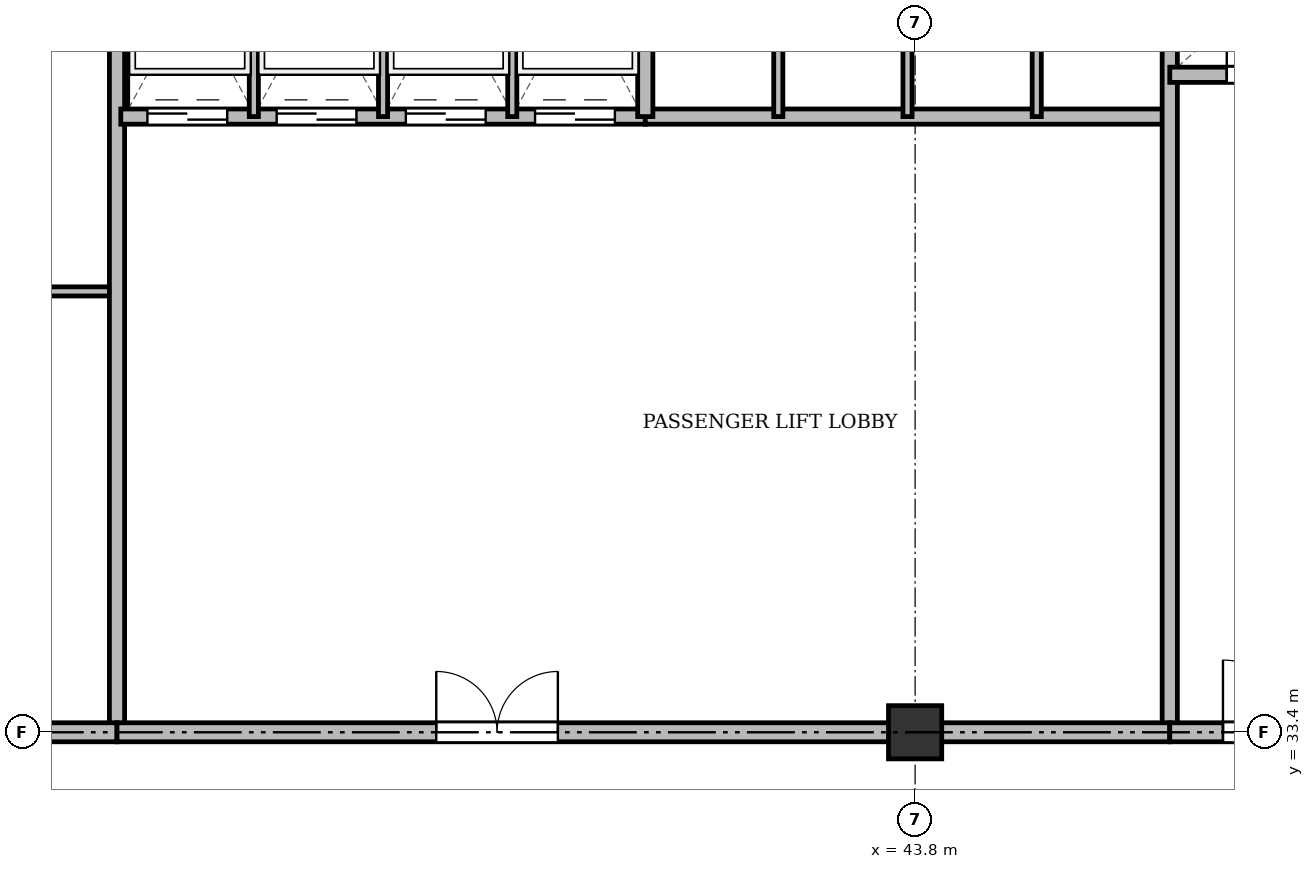
"""IFC4 building model, lengths in metres.
Left out: names, types, materials, properties, quantities, classifications, styles, units other than length and angle.
Written with IfcOpenShell. Run it as: python <this file> out.ifc"""

import sys

from ifc_helpers import new_model, si_unit, direction, frame, frame_2d, origin, origin_2d, place, context, subcontext, project, spatial, rectangle, extrude, source, transform, mapped, element, fill, save


model = new_model("IFC4")
c1 = context("Model", 3, precision=1e-05, world=origin(), true_north=direction((0.0, 1.0)))
c2 = subcontext(c1, "Body", "Model", "MODEL_VIEW")
j1 = project(units=[si_unit("LENGTHUNIT", "METRE"), si_unit("PLANEANGLEUNIT", "RADIAN")], contexts=[c1])
p1 = place(None, origin())
s1 = spatial("IfcSite", under=j1, at=p1, CompositionType="ELEMENT")
p2 = place(p1, origin())
s2 = spatial("IfcBuilding", under=s1, at=p2, CompositionType="ELEMENT")
p3 = place(p2, frame((0.0, 0.0, 178.9)))
s3 = spatial("IfcBuildingStorey", under=s2, at=p3, CompositionType="ELEMENT", Elevation=178.9)
m1 = source(origin(), c2, "Body", "SweptSolid", [
    extrude(rectangle(XDim=0.7, YDim=0.7, at=origin_2d()), origin(), (0.0, 0.0, 1.0), 3.6),
])
p4 = place(p3, frame((43.8, 33.4, 0.0), z_axis=(0.0, 0.0, 1.0), x_axis=(1.0, 0.0, 0.0)))
e1 = element("IfcColumn", 1, at=p4, inside=s3, PredefinedType="COLUMN", context=c2, shape_type="MappedRepresentation", body=[
    mapped(m1, transform((0.0, 0.0, 0.0), x_axis=(1.0, 0.0, 0.0), y_axis=(0.0, 1.0, 0.0), z_axis=(0.0, 0.0, 1.0), scale=1.0)),
])
p5 = place(p3, frame((26.3, 39.2, 0.0), z_axis=(0.0, 0.0, 1.0), x_axis=(1.0, 0.0, 0.0)))
e2 = element("IfcWall", 2, at=p5, inside=s3, PredefinedType="PARTITIONING", context=c2, shape_type="SweptSolid", body=[
    extrude(rectangle(XDim=7.0, YDim=0.12, at=frame_2d((3.5, 0.0))), origin(), (0.0, 0.0, 1.0), 2.72),
])
p6 = place(p5, frame((2.6, 0.0, 0.0)))
e3 = element("IfcOpeningElement", 3, at=p6, cuts=e2, PredefinedType="OPENING", context=c2, shape_type="SweptSolid", body=[
    extrude(rectangle(XDim=0.95, YDim=2.15, at=frame_2d((0.475, 1.075))), frame((0.0, 0.07, 0.0), z_axis=(0.0, -1.0, 0.0), x_axis=(1.0, 0.0, 0.0)), (0.0, 0.0, 1.0), 0.14),
])
p7 = place(p3, frame((33.3, 33.4, 0.0), z_axis=(0.0, 0.0, 1.0), x_axis=(0.0, 1.0, 0.0)))
e4 = element("IfcWall", 4, at=p7, inside=s3, PredefinedType="SOLIDWALL", context=c2, shape_type="SweptSolid", body=[
    extrude(rectangle(XDim=11.3, YDim=0.2, at=frame_2d((5.65, 0.0))), origin(), (0.0, 0.0, 1.0), 2.62),
])
p8 = place(p3, frame((33.35, 41.5, 0.0), z_axis=(0.0, 0.0, 1.0), x_axis=(1.0, 0.0, 0.0)))
e5 = element("IfcWall", 5, at=p8, inside=s3, PredefinedType="SOLIDWALL", context=c2, shape_type="SweptSolid", body=[
    extrude(rectangle(XDim=6.9, YDim=0.2, at=frame_2d((3.45, 0.0))), origin(), (0.0, 0.0, 1.0), 3.22),
])
p9 = place(p8, frame((0.35, 0.0, 0.0)))
e6 = element("IfcOpeningElement", 6, at=p9, cuts=e5, PredefinedType="OPENING", context=c2, shape_type="SweptSolid", body=[
    extrude(rectangle(XDim=1.05, YDim=2.15, at=frame_2d((0.525, 1.075))), frame((0.0, 0.11, 0.0), z_axis=(0.0, -1.0, 0.0), x_axis=(1.0, 0.0, 0.0)), (0.0, 0.0, 1.0), 0.22),
])
p10 = place(p8, frame((2.05, 0.0, 0.0)))
e7 = element("IfcOpeningElement", 7, at=p10, cuts=e5, PredefinedType="OPENING", context=c2, shape_type="SweptSolid", body=[
    extrude(rectangle(XDim=1.05, YDim=2.15, at=frame_2d((0.525, 1.075))), frame((0.0, 0.11, 0.0), z_axis=(0.0, -1.0, 0.0), x_axis=(1.0, 0.0, 0.0)), (0.0, 0.0, 1.0), 0.22),
])
p11 = place(p8, frame((3.75, 0.0, 0.0)))
e8 = element("IfcOpeningElement", 8, at=p11, cuts=e5, PredefinedType="OPENING", context=c2, shape_type="SweptSolid", body=[
    extrude(rectangle(XDim=1.05, YDim=2.15, at=frame_2d((0.525, 1.075))), frame((0.0, 0.11, 0.0), z_axis=(0.0, -1.0, 0.0), x_axis=(1.0, 0.0, 0.0)), (0.0, 0.0, 1.0), 0.22),
])
p12 = place(p8, frame((5.45, 0.0, 0.0)))
e9 = element("IfcOpeningElement", 9, at=p12, cuts=e5, PredefinedType="OPENING", context=c2, shape_type="SweptSolid", body=[
    extrude(rectangle(XDim=1.05, YDim=2.15, at=frame_2d((0.525, 1.075))), frame((0.0, 0.11, 0.0), z_axis=(0.0, -1.0, 0.0), x_axis=(1.0, 0.0, 0.0)), (0.0, 0.0, 1.0), 0.22),
])
for number, where, z_axis, x_axis in (
    (10, (35.1, 41.5, 0.0), (0.0, 0.0, 1.0), (0.0, 1.0, 0.0)),
    (11, (36.8, 41.5, 0.0), (0.0, 0.0, 1.0), (0.0, 1.0, 0.0)),
    (12, (38.5, 41.5, 0.0), (0.0, 0.0, 1.0), (0.0, 1.0, 0.0)),
):
    element("IfcWall", number, at=place(p3, frame(where, z_axis=z_axis, x_axis=x_axis)), inside=s3, PredefinedType="PARTITIONING", context=c2, shape_type="SweptSolid", body=[
        extrude(rectangle(XDim=3.2, YDim=0.12, at=frame_2d((1.6, 0.0))), origin(), (0.0, 0.0, 1.0), 3.22),
    ])
p13 = place(p3, frame((40.25, 41.5, 0.0), z_axis=(0.0, 0.0, 1.0), x_axis=(1.0, 0.0, 0.0)))
e13 = element("IfcWall", 13, at=p13, inside=s3, PredefinedType="SOLIDWALL", context=c2, shape_type="SweptSolid", body=[
    extrude(rectangle(XDim=6.9, YDim=0.2, at=frame_2d((3.45, 0.0))), origin(), (0.0, 0.0, 1.0), 2.72),
])
p14 = place(p3, frame((40.25, 41.5, 0.0), z_axis=(0.0, 0.0, 1.0), x_axis=(0.0, 1.0, 0.0)))
e14 = element("IfcWall", 14, at=p14, inside=s3, PredefinedType="SOLIDWALL", context=c2, shape_type="SweptSolid", body=[
    extrude(rectangle(XDim=3.2, YDim=0.2, at=frame_2d((1.6, 0.0))), origin(), (0.0, 0.0, 1.0), 3.22),
])
p15 = place(p3, frame((42.0, 41.5, 0.0), z_axis=(0.0, 0.0, 1.0), x_axis=(0.0, 1.0, 0.0)))
e15 = element("IfcWall", 15, at=p15, inside=s3, PredefinedType="PARTITIONING", context=c2, shape_type="SweptSolid", body=[
    extrude(rectangle(XDim=3.2, YDim=0.12, at=frame_2d((1.6, 0.0))), origin(), (0.0, 0.0, 1.0), 3.22),
])
p16 = place(p3, frame((43.7, 41.5, 0.0), z_axis=(0.0, 0.0, 1.0), x_axis=(0.0, 1.0, 0.0)))
e16 = element("IfcWall", 16, at=p16, inside=s3, PredefinedType="PARTITIONING", context=c2, shape_type="SweptSolid", body=[
    extrude(rectangle(XDim=3.2, YDim=0.12, at=frame_2d((1.6, 0.0))), origin(), (0.0, 0.0, 1.0), 2.72),
])
p17 = place(p3, frame((45.4, 41.5, 0.0), z_axis=(0.0, 0.0, 1.0), x_axis=(0.0, 1.0, 0.0)))
e17 = element("IfcWall", 17, at=p17, inside=s3, PredefinedType="PARTITIONING", context=c2, shape_type="SweptSolid", body=[
    extrude(rectangle(XDim=3.2, YDim=0.12, at=frame_2d((1.6, 0.0))), origin(), (0.0, 0.0, 1.0), 3.22),
])
p18 = place(p3, frame((47.15, 33.4, 0.0), z_axis=(0.0, 0.0, 1.0), x_axis=(0.0, 1.0, 0.0)))
e18 = element("IfcWall", 18, at=p18, inside=s3, PredefinedType="SOLIDWALL", context=c2, shape_type="SweptSolid", body=[
    extrude(rectangle(XDim=11.3, YDim=0.2, at=frame_2d((5.65, 0.0))), origin(), (0.0, 0.0, 1.0), 2.62),
])
p19 = place(p3, frame((26.3, 33.4, 0.0), z_axis=(0.0, 0.0, 1.0), x_axis=(1.0, 0.0, 0.0)))
e19 = element("IfcWall", 19, at=p19, inside=s3, PredefinedType="PARTITIONING", context=c2, shape_type="SweptSolid", body=[
    extrude(rectangle(XDim=7.0, YDim=0.25, at=frame_2d((3.5, 0.0))), origin(), (0.0, 0.0, 1.0), 2.62),
])
p20 = place(p19, frame((1.35, 0.0, 0.0)))
e20 = element("IfcOpeningElement", 20, at=p20, cuts=e19, PredefinedType="OPENING", context=c2, shape_type="SweptSolid", body=[
    extrude(rectangle(XDim=0.95, YDim=2.15, at=frame_2d((0.475, 1.075))), frame((0.0, 0.135, 0.0), z_axis=(0.0, -1.0, 0.0), x_axis=(1.0, 0.0, 0.0)), (0.0, 0.0, 1.0), 0.27),
])
p21 = place(p3, frame((33.3, 33.4, 0.0), z_axis=(0.0, 0.0, 1.0), x_axis=(1.0, 0.0, 0.0)))
e21 = element("IfcWall", 21, at=p21, inside=s3, PredefinedType="PARTITIONING", context=c2, shape_type="SweptSolid", body=[
    extrude(rectangle(XDim=13.85, YDim=0.25, at=frame_2d((6.925, 0.0))), origin(), (0.0, 0.0, 1.0), 2.62),
])
p22 = place(p21, frame((4.2, 0.0, 0.0)))
e22 = element("IfcOpeningElement", 22, at=p22, cuts=e21, PredefinedType="OPENING", context=c2, shape_type="SweptSolid", body=[
    extrude(rectangle(XDim=1.6, YDim=2.2, at=frame_2d((0.8, 1.1))), frame((0.0, 0.135, 0.0), z_axis=(0.0, -1.0, 0.0), x_axis=(1.0, 0.0, 0.0)), (0.0, 0.0, 1.0), 0.27),
])
p23 = place(p3, frame((47.15, 42.05, 0.0), z_axis=(0.0, 0.0, 1.0), x_axis=(1.0, 0.0, 0.0)))
e23 = element("IfcWall", 23, at=p23, inside=s3, PredefinedType="SOLIDWALL", context=c2, shape_type="SweptSolid", body=[
    extrude(rectangle(XDim=7.85, YDim=0.2, at=frame_2d((3.925, 0.0))), origin(), (0.0, 0.0, 1.0), 2.72),
])
p24 = place(p23, frame((0.75, 0.0, 0.0)))
e24 = element("IfcOpeningElement", 24, at=p24, cuts=e23, PredefinedType="OPENING", context=c2, shape_type="SweptSolid", body=[
    extrude(rectangle(XDim=0.9, YDim=2.1, at=frame_2d((0.45, 1.05))), frame((0.0, 0.11, 0.0), z_axis=(0.0, -1.0, 0.0), x_axis=(1.0, 0.0, 0.0)), (0.0, 0.0, 1.0), 0.22),
])
p25 = place(p23, frame((3.85, 0.0, 0.0)))
e25 = element("IfcOpeningElement", 25, at=p25, cuts=e23, PredefinedType="OPENING", context=c2, shape_type="SweptSolid", body=[
    extrude(rectangle(XDim=0.9, YDim=2.1, at=frame_2d((0.45, 1.05))), frame((0.0, 0.11, 0.0), z_axis=(0.0, -1.0, 0.0), x_axis=(1.0, 0.0, 0.0)), (0.0, 0.0, 1.0), 0.22),
])
p26 = place(p3, frame((47.15, 33.4, 0.0), z_axis=(0.0, 0.0, 1.0), x_axis=(1.0, 0.0, 0.0)))
e26 = element("IfcWall", 26, at=p26, inside=s3, PredefinedType="PARTITIONING", context=c2, shape_type="SweptSolid", body=[
    extrude(rectangle(XDim=11.15, YDim=0.25, at=frame_2d((5.575, 0.0))), origin(), (0.0, 0.0, 1.0), 2.62),
])
p27 = place(p26, frame((0.7, 0.0, 0.0)))
e27 = element("IfcOpeningElement", 27, at=p27, cuts=e26, PredefinedType="OPENING", context=c2, shape_type="SweptSolid", body=[
    extrude(rectangle(XDim=0.95, YDim=2.15, at=frame_2d((0.475, 1.075))), frame((0.0, 0.135, 0.0), z_axis=(0.0, -1.0, 0.0), x_axis=(1.0, 0.0, 0.0)), (0.0, 0.0, 1.0), 0.27),
])
p28 = place(p26, frame((6.0, 0.0, 0.0)))
e28 = element("IfcOpeningElement", 28, at=p28, cuts=e26, PredefinedType="OPENING", context=c2, shape_type="SweptSolid", body=[
    extrude(rectangle(XDim=1.2, YDim=2.15, at=frame_2d((0.6, 1.075))), frame((0.0, 0.135, 0.0), z_axis=(0.0, -1.0, 0.0), x_axis=(1.0, 0.0, 0.0)), (0.0, 0.0, 1.0), 0.27),
])
m2 = source(origin(), c2, "Body", "SweptSolid", [
    extrude(rectangle(XDim=1.05, YDim=2.15, at=frame_2d((0.525, 1.075))), frame((0.0, 0.025, 0.0), z_axis=(0.0, -1.0, 0.0), x_axis=(1.0, 0.0, 0.0)), (0.0, 0.0, 1.0), 0.05),
])
p29 = place(p9, origin())
e29 = element("IfcDoor", 29, at=p29, inside=s3, OperationType="DOUBLE_DOOR_SLIDING", PredefinedType="DOOR", context=c2, shape_type="MappedRepresentation", body=[
    mapped(m2, transform((0.0, 0.0, 0.0), x_axis=(1.0, 0.0, 0.0), y_axis=(0.0, 1.0, 0.0), z_axis=(0.0, 0.0, 1.0), scale=1.0)),
])
fill(e6, e29)
p30 = place(p10, origin())
e30 = element("IfcDoor", 30, at=p30, inside=s3, OperationType="DOUBLE_DOOR_SLIDING", PredefinedType="DOOR", context=c2, shape_type="MappedRepresentation", body=[
    mapped(m2, transform((0.0, 0.0, 0.0), x_axis=(1.0, 0.0, 0.0), y_axis=(0.0, 1.0, 0.0), z_axis=(0.0, 0.0, 1.0), scale=1.0)),
])
fill(e7, e30)
p31 = place(p11, origin())
e31 = element("IfcDoor", 31, at=p31, inside=s3, OperationType="DOUBLE_DOOR_SLIDING", PredefinedType="DOOR", context=c2, shape_type="MappedRepresentation", body=[
    mapped(m2, transform((0.0, 0.0, 0.0), x_axis=(1.0, 0.0, 0.0), y_axis=(0.0, 1.0, 0.0), z_axis=(0.0, 0.0, 1.0), scale=1.0)),
])
fill(e8, e31)
p32 = place(p12, origin())
e32 = element("IfcDoor", 32, at=p32, inside=s3, OperationType="DOUBLE_DOOR_SLIDING", PredefinedType="DOOR", context=c2, shape_type="MappedRepresentation", body=[
    mapped(m2, transform((0.0, 0.0, 0.0), x_axis=(1.0, 0.0, 0.0), y_axis=(0.0, 1.0, 0.0), z_axis=(0.0, 0.0, 1.0), scale=1.0)),
])
fill(e9, e32)
m3 = source(origin(), c2, "Body", "SweptSolid", [
    extrude(rectangle(XDim=1.6, YDim=2.2, at=frame_2d((0.8, 1.1))), frame((0.0, 0.025, 0.0), z_axis=(0.0, -1.0, 0.0), x_axis=(1.0, 0.0, 0.0)), (0.0, 0.0, 1.0), 0.05),
])
p33 = place(p22, origin())
e33 = element("IfcDoor", 33, at=p33, inside=s3, OperationType="DOUBLE_DOOR_SINGLE_SWING", PredefinedType="DOOR", context=c2, shape_type="MappedRepresentation", body=[
    mapped(m3, transform((0.0, 0.0, 0.0), x_axis=(1.0, 0.0, 0.0), y_axis=(0.0, 1.0, 0.0), z_axis=(0.0, 0.0, 1.0), scale=1.0)),
])
fill(e22, e33)
m4 = source(origin(), c2, "Body", "SweptSolid", [
    extrude(rectangle(XDim=0.9, YDim=2.1, at=frame_2d((0.45, 1.05))), frame((0.0, 0.025, 0.0), z_axis=(0.0, -1.0, 0.0), x_axis=(1.0, 0.0, 0.0)), (0.0, 0.0, 1.0), 0.05),
])
p34 = place(p24, origin())
e34 = element("IfcDoor", 34, at=p34, inside=s3, OperationType="SINGLE_SWING_LEFT", PredefinedType="DOOR", context=c2, shape_type="MappedRepresentation", body=[
    mapped(m4, transform((0.0, 0.0, 0.0), x_axis=(1.0, 0.0, 0.0), y_axis=(0.0, 1.0, 0.0), z_axis=(0.0, 0.0, 1.0), scale=1.0)),
])
fill(e24, e34)
m5 = source(origin(), c2, "Body", "SweptSolid", [
    extrude(rectangle(XDim=0.95, YDim=2.15, at=frame_2d((0.475, 1.075))), frame((0.0, 0.025, 0.0), z_axis=(0.0, -1.0, 0.0), x_axis=(1.0, 0.0, 0.0)), (0.0, 0.0, 1.0), 0.05),
])
p35 = place(p27, origin())
e35 = element("IfcDoor", 35, at=p35, inside=s3, OperationType="SINGLE_SWING_LEFT", PredefinedType="DOOR", context=c2, shape_type="MappedRepresentation", body=[
    mapped(m5, transform((0.0, 0.0, 0.0), x_axis=(1.0, 0.0, 0.0), y_axis=(0.0, 1.0, 0.0), z_axis=(0.0, 0.0, 1.0), scale=1.0)),
])
fill(e27, e35)
save(model, sys.argv[1])
